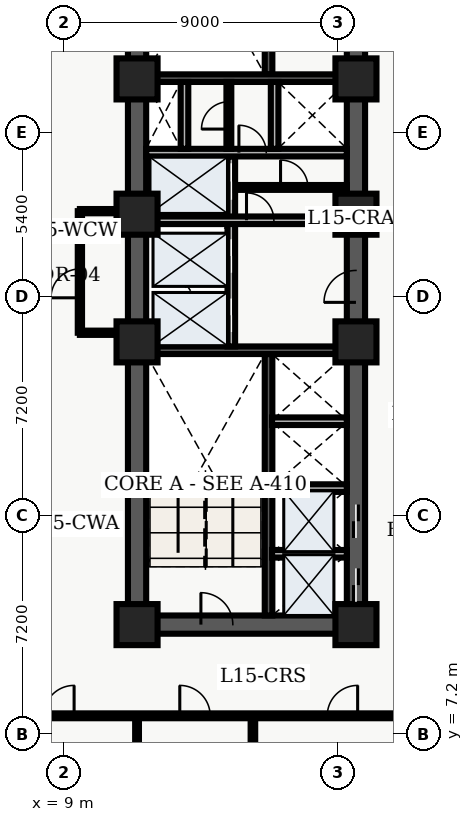
"""IFC4 building model, lengths in metres.
Left out: names, types, materials, properties, quantities, classifications, styles, units other than length and angle.
Written with IfcOpenShell. Run it as: python <this file> out.ifc"""

import sys

from ifc_helpers import new_model, entity, si_unit, converted_unit, direction, frame, origin_with_axes, origin_2d_with_axis, place, context, subcontext, project, spatial, polyline, rectangle, outline, extrude, element, fill, save


model = new_model("IFC4")
c1 = context("Model", 3, precision=1e-05, world=origin_with_axes(), true_north=direction((0.0, 1.0)))
c2 = subcontext(c1, "Body", "Model", "MODEL_VIEW")
j1 = project(units=[si_unit("LENGTHUNIT", "METRE"), converted_unit("PLANEANGLEUNIT", "DEGREE", entity("IfcPlaneAngleMeasure", 0.017), si_unit("PLANEANGLEUNIT", "RADIAN"), dimensions=[0, 0, 0, 0, 0, 0, 0])], contexts=[c1])
p1 = place(None, origin_with_axes())
s1 = spatial("IfcSite", under=j1, at=p1, CompositionType="ELEMENT")
p2 = place(p1, origin_with_axes())
s2 = spatial("IfcBuilding", under=s1, at=p2, CompositionType="ELEMENT")
p3 = place(p2, frame((0.0, 0.0, 63.9), z_axis=(0.0, 0.0, 1.0), x_axis=(1.0, 0.0, 0.0)))
s3 = spatial("IfcBuildingStorey", under=s2, at=p3, CompositionType="ELEMENT", Elevation=63.9)
p4 = place(p3, frame((11.4, 10.8, 0.0), z_axis=(0.0, 0.0, 1.0), x_axis=(0.0, 1.0, 0.0)))
e1 = element("IfcWall", 1, at=p4, inside=s3, PredefinedType="SHEAR", context=c2, shape_type="SweptSolid", body=[
    extrude(outline(polyline([(0.0, -0.3), (27.0, -0.3), (27.0, 0.3), (0.0, 0.3), (0.0, -0.3)])), origin_with_axes(), (0.0, 0.0, 1.0), 3.66),
])
p5 = place(p3, frame((11.4, 10.8, 0.0), z_axis=(0.0, 0.0, 1.0), x_axis=(1.0, 0.0, 0.0)))
e2 = element("IfcWall", 2, at=p5, inside=s3, PredefinedType="SHEAR", context=c2, shape_type="SweptSolid", body=[
    extrude(outline(polyline([(0.0, -0.3), (7.2, -0.3), (7.2, 0.3), (0.0, 0.3), (0.0, -0.3)])), origin_with_axes(), (0.0, 0.0, 1.0), 3.66),
])
p6 = place(p5, frame((2.625, 0.0, 0.0), z_axis=(0.0, 0.0, 1.0), x_axis=(1.0, 0.0, 0.0)))
e3 = element("IfcOpeningElement", 3, at=p6, cuts=e2, PredefinedType="OPENING", context=c2, shape_type="SweptSolid", body=[
    extrude(rectangle(XDim=1.05, YDim=0.62, at=origin_2d_with_axis()), origin_with_axes(), (0.0, 0.0, 1.0), 2.15),
])
p7 = place(p3, frame((18.6, 10.8, 0.0), z_axis=(0.0, 0.0, 1.0), x_axis=(0.0, 1.0, 0.0)))
e4 = element("IfcWall", 4, at=p7, inside=s3, PredefinedType="SHEAR", context=c2, shape_type="SweptSolid", body=[
    extrude(outline(polyline([(0.0, -0.3), (13.5, -0.3), (13.5, 0.3), (0.0, 0.3), (0.0, -0.3)])), origin_with_axes(), (0.0, 0.0, 1.0), 3.66),
])
p8 = place(p7, frame((1.3, 0.0, 0.0), z_axis=(0.0, 0.0, 1.0), x_axis=(1.0, 0.0, 0.0)))
e5 = element("IfcOpeningElement", 5, at=p8, cuts=e4, PredefinedType="OPENING", context=c2, shape_type="SweptSolid", body=[
    extrude(rectangle(XDim=1.1, YDim=0.62, at=origin_2d_with_axis()), origin_with_axes(), (0.0, 0.0, 1.0), 2.15),
])
p9 = place(p7, frame((3.4, 0.0, 0.0), z_axis=(0.0, 0.0, 1.0), x_axis=(1.0, 0.0, 0.0)))
e6 = element("IfcOpeningElement", 6, at=p9, cuts=e4, PredefinedType="OPENING", context=c2, shape_type="SweptSolid", body=[
    extrude(rectangle(XDim=1.1, YDim=0.62, at=origin_2d_with_axis()), origin_with_axes(), (0.0, 0.0, 1.0), 2.15),
])
p10 = place(p7, frame((11.125, 0.0, 0.0), z_axis=(0.0, 0.0, 1.0), x_axis=(1.0, 0.0, 0.0)))
e7 = element("IfcOpeningElement", 7, at=p10, cuts=e4, PredefinedType="OPENING", context=c2, shape_type="SweptSolid", body=[
    extrude(rectangle(XDim=1.05, YDim=0.62, at=origin_2d_with_axis()), origin_with_axes(), (0.0, 0.0, 1.0), 2.15),
])
p11 = place(p3, frame((18.6, 24.3, 0.0), z_axis=(0.0, 0.0, 1.0), x_axis=(0.0, 1.0, 0.0)))
e8 = element("IfcWall", 8, at=p11, inside=s3, PredefinedType="SHEAR", context=c2, shape_type="SweptSolid", body=[
    extrude(outline(polyline([(0.0, -0.3), (13.5, -0.3), (13.5, 0.3), (0.0, 0.3), (0.0, -0.3)])), origin_with_axes(), (0.0, 0.0, 1.0), 3.66),
])
p12 = place(p11, frame((6.025, 0.0, 0.0), z_axis=(0.0, 0.0, 1.0), x_axis=(1.0, 0.0, 0.0)))
e9 = element("IfcOpeningElement", 9, at=p12, cuts=e8, PredefinedType="OPENING", context=c2, shape_type="SweptSolid", body=[
    extrude(rectangle(XDim=0.95, YDim=0.62, at=origin_2d_with_axis()), origin_with_axes(), (0.0, 0.0, 1.0), 2.15),
])
p13 = place(p11, frame((7.825, 0.0, 0.0), z_axis=(0.0, 0.0, 1.0), x_axis=(1.0, 0.0, 0.0)))
e10 = element("IfcOpeningElement", 10, at=p13, cuts=e8, PredefinedType="OPENING", context=c2, shape_type="SweptSolid", body=[
    extrude(rectangle(XDim=0.95, YDim=0.62, at=origin_2d_with_axis()), origin_with_axes(), (0.0, 0.0, 1.0), 2.15),
])
p14 = place(p3, frame((15.725, 11.1, 0.0), z_axis=(0.0, 0.0, 1.0), x_axis=(0.0, 1.0, 0.0)))
e11 = element("IfcWall", 11, at=p14, inside=s3, PredefinedType="SHEAR", context=c2, shape_type="SweptSolid", body=[
    extrude(outline(polyline([(0.0, -0.125), (8.6, -0.125), (8.6, 0.125), (0.0, 0.125), (0.0, -0.125)])), origin_with_axes(), (0.0, 0.0, 1.0), 3.66),
])
p15 = place(p3, frame((11.7, 19.825, 0.0), z_axis=(0.0, 0.0, 1.0), x_axis=(1.0, 0.0, 0.0)))
e12 = element("IfcWall", 12, at=p15, inside=s3, PredefinedType="SHEAR", context=c2, shape_type="SweptSolid", body=[
    extrude(outline(polyline([(0.0, -0.125), (6.6, -0.125), (6.6, 0.125), (0.0, 0.125), (0.0, -0.125)])), origin_with_axes(), (0.0, 0.0, 1.0), 3.66),
])
p16 = place(p3, frame((15.725, 28.9, 0.0), z_axis=(0.0, 0.0, 1.0), x_axis=(0.0, 1.0, 0.0)))
e13 = element("IfcWall", 13, at=p16, inside=s3, PredefinedType="SHEAR", context=c2, shape_type="SweptSolid", body=[
    extrude(outline(polyline([(0.0, -0.125), (8.6, -0.125), (8.6, 0.125), (0.0, 0.125), (0.0, -0.125)])), origin_with_axes(), (0.0, 0.0, 1.0), 3.66),
])
p17 = place(p3, frame((11.7, 28.775, 0.0), z_axis=(0.0, 0.0, 1.0), x_axis=(1.0, 0.0, 0.0)))
e14 = element("IfcWall", 14, at=p17, inside=s3, PredefinedType="SHEAR", context=c2, shape_type="SweptSolid", body=[
    extrude(outline(polyline([(0.0, -0.125), (6.6, -0.125), (6.6, 0.125), (0.0, 0.125), (0.0, -0.125)])), origin_with_axes(), (0.0, 0.0, 1.0), 3.66),
])
p18 = place(p3, frame((14.5, 19.95, 0.0), z_axis=(0.0, 0.0, 1.0), x_axis=(0.0, 1.0, 0.0)))
e15 = element("IfcWall", 15, at=p18, inside=s3, PredefinedType="SOLIDWALL", context=c2, shape_type="SweptSolid", body=[
    extrude(outline(polyline([(0.0, -0.125), (6.25, -0.125), (6.25, 0.125), (0.0, 0.125), (0.0, -0.125)])), origin_with_axes(), (0.0, 0.0, 1.0), 2.7),
])
p19 = place(p18, frame((1.025, 0.0, 0.0), z_axis=(0.0, 0.0, 1.0), x_axis=(1.0, 0.0, 0.0)))
e16 = element("IfcOpeningElement", 16, at=p19, cuts=e15, PredefinedType="OPENING", context=c2, shape_type="SweptSolid", body=[
    extrude(rectangle(XDim=1.1, YDim=0.27, at=origin_2d_with_axis()), origin_with_axes(), (0.0, 0.0, 1.0), 2.15),
])
p20 = place(p18, frame((2.975, 0.0, 0.0), z_axis=(0.0, 0.0, 1.0), x_axis=(1.0, 0.0, 0.0)))
e17 = element("IfcOpeningElement", 17, at=p20, cuts=e15, PredefinedType="OPENING", context=c2, shape_type="SweptSolid", body=[
    extrude(rectangle(XDim=1.1, YDim=0.27, at=origin_2d_with_axis()), origin_with_axes(), (0.0, 0.0, 1.0), 2.15),
])
p21 = place(p18, frame((5.425, 0.0, 0.0), z_axis=(0.0, 0.0, 1.0), x_axis=(1.0, 0.0, 0.0)))
e18 = element("IfcOpeningElement", 18, at=p21, cuts=e15, PredefinedType="OPENING", context=c2, shape_type="SweptSolid", body=[
    extrude(rectangle(XDim=1.2, YDim=0.27, at=origin_2d_with_axis()), origin_with_axes(), (0.0, 0.0, 1.0), 2.15),
])
p22 = place(p3, frame((11.7, 24.1, 0.0), z_axis=(0.0, 0.0, 1.0), x_axis=(1.0, 0.0, 0.0)))
e19 = element("IfcWall", 19, at=p22, inside=s3, PredefinedType="SOLIDWALL", context=c2, shape_type="SweptSolid", body=[
    extrude(outline(polyline([(0.0, -0.125), (6.6, -0.125), (6.6, 0.125), (0.0, 0.125), (0.0, -0.125)])), origin_with_axes(), (0.0, 0.0, 1.0), 2.7),
])
p23 = place(p22, frame((3.75, 0.0, 0.0), z_axis=(0.0, 0.0, 1.0), x_axis=(1.0, 0.0, 0.0)))
e20 = element("IfcOpeningElement", 20, at=p23, cuts=e19, PredefinedType="OPENING", context=c2, shape_type="SweptSolid", body=[
    extrude(rectangle(XDim=0.9, YDim=0.27, at=origin_2d_with_axis()), origin_with_axes(), (0.0, 0.0, 1.0), 2.15),
])
p24 = place(p3, frame((11.7, 26.325, 0.0), z_axis=(0.0, 0.0, 1.0), x_axis=(1.0, 0.0, 0.0)))
e21 = element("IfcWall", 21, at=p24, inside=s3, PredefinedType="SOLIDWALL", context=c2, shape_type="SweptSolid", body=[
    extrude(outline(polyline([(0.0, -0.125), (6.6, -0.125), (6.6, 0.125), (0.0, 0.125), (0.0, -0.125)])), origin_with_axes(), (0.0, 0.0, 1.0), 2.7),
])
p25 = place(p24, frame((3.5, 0.0, 0.0), z_axis=(0.0, 0.0, 1.0), x_axis=(1.0, 0.0, 0.0)))
e22 = element("IfcOpeningElement", 22, at=p25, cuts=e21, PredefinedType="OPENING", context=c2, shape_type="SweptSolid", body=[
    extrude(rectangle(XDim=0.9, YDim=0.27, at=origin_2d_with_axis()), origin_with_axes(), (0.0, 0.0, 1.0), 2.15),
])
for number, where, z_axis, x_axis in (
    (23, (12.96, 26.45, 0.0), (0.0, 0.0, 1.0), (0.0, 1.0, 0.0)),
    (24, (15.925, 26.45, 0.0), (0.0, 0.0, 1.0), (0.0, 1.0, 0.0)),
):
    element("IfcWall", number, at=place(p3, frame(where, z_axis=z_axis, x_axis=x_axis)), inside=s3, PredefinedType="SOLIDWALL", context=c2, shape_type="SweptSolid", body=[
        extrude(outline(polyline([(0.0, -0.125), (2.2, -0.125), (2.2, 0.125), (0.0, 0.125), (0.0, -0.125)])), origin_with_axes(), (0.0, 0.0, 1.0), 2.7),
    ])
for number, where, z_axis, x_axis in (
    (25, (11.4, 10.8, 0.0), (0.0, 0.0, 1.0), (1.0, 0.0, 0.0)),
    (26, (11.4, 20.1, 0.0), (0.0, 0.0, 1.0), (1.0, 0.0, 0.0)),
    (27, (11.4, 24.3, 0.0), (0.0, 0.0, 1.0), (1.0, 0.0, 0.0)),
    (28, (11.4, 28.75, 0.0), (0.0, 0.0, 1.0), (1.0, 0.0, 0.0)),
    (29, (18.6, 10.8, 0.0), (0.0, 0.0, 1.0), (1.0, 0.0, 0.0)),
    (30, (18.6, 20.1, 0.0), (0.0, 0.0, 1.0), (1.0, 0.0, 0.0)),
    (31, (18.6, 24.3, 0.0), (0.0, 0.0, 1.0), (1.0, 0.0, 0.0)),
    (32, (18.6, 28.75, 0.0), (0.0, 0.0, 1.0), (1.0, 0.0, 0.0)),
):
    element("IfcColumn", number, at=place(p3, frame(where, z_axis=z_axis, x_axis=x_axis)), inside=s3, PredefinedType="COLUMN", context=c2, shape_type="SweptSolid", body=[
        extrude(rectangle(XDim=1.35, YDim=1.35, at=origin_2d_with_axis()), origin_with_axes(), (0.0, 0.0, 1.0), 3.9),
    ])
p26 = place(p3, frame((14.62, 25.18, 0.0), z_axis=(0.0, 0.0, 1.0), x_axis=(1.0, 0.0, 0.0)))
e33 = element("IfcWall", 33, at=p26, inside=s3, PredefinedType="PARTITIONING", context=c2, shape_type="SweptSolid", body=[
    extrude(outline(polyline([(0.0, -0.08), (3.68, -0.08), (3.68, 0.08), (0.0, 0.08), (0.0, -0.08)])), origin_with_axes(), (0.0, 0.0, 1.0), 2.7),
])
p27 = place(p26, frame((1.95, 0.0, 0.0), z_axis=(0.0, 0.0, 1.0), x_axis=(1.0, 0.0, 0.0)))
e34 = element("IfcOpeningElement", 34, at=p27, cuts=e33, PredefinedType="OPENING", context=c2, shape_type="SweptSolid", body=[
    extrude(rectangle(XDim=0.9, YDim=0.18, at=origin_2d_with_axis()), origin_with_axes(), (0.0, 0.0, 1.0), 2.15),
])
p28 = place(p3, frame((14.42, 26.45, 0.0), z_axis=(0.0, 0.0, 1.0), x_axis=(0.0, 1.0, 0.0)))
e35 = element("IfcWall", 35, at=p28, inside=s3, PredefinedType="PARTITIONING", context=c2, shape_type="SweptSolid", body=[
    extrude(outline(polyline([(0.0, -0.08), (2.2, -0.08), (2.2, 0.08), (0.0, 0.08), (0.0, -0.08)])), origin_with_axes(), (0.0, 0.0, 1.0), 2.7),
])
p29 = place(p28, frame((1.1, 0.0, 0.0), z_axis=(0.0, 0.0, 1.0), x_axis=(1.0, 0.0, 0.0)))
e36 = element("IfcOpeningElement", 36, at=p29, cuts=e35, PredefinedType="OPENING", context=c2, shape_type="SweptSolid", body=[
    extrude(rectangle(XDim=0.9, YDim=0.18, at=origin_2d_with_axis()), origin_with_axes(), (0.0, 0.0, 1.0), 2.15),
])
for number, where, z_axis, x_axis in (
    (37, (15.84, 13.13, 0.0), (0.0, 0.0, 1.0), (1.0, 0.0, 0.0)),
    (38, (15.84, 15.29, 0.0), (0.0, 0.0, 1.0), (1.0, 0.0, 0.0)),
    (39, (15.84, 17.49, 0.0), (0.0, 0.0, 1.0), (1.0, 0.0, 0.0)),
):
    element("IfcWall", number, at=place(p3, frame(where, z_axis=z_axis, x_axis=x_axis)), inside=s3, PredefinedType="SOLIDWALL", context=c2, shape_type="SweptSolid", body=[
        extrude(outline(polyline([(0.0, -0.125), (2.46, -0.125), (2.46, 0.125), (0.0, 0.125), (0.0, -0.125)])), origin_with_axes(), (0.0, 0.0, 1.0), 2.7),
    ])
p30 = place(p3, frame((9.52, 20.4, 0.0), z_axis=(0.0, 0.0, 1.0), x_axis=(0.0, 1.0, 0.0)))
e40 = element("IfcWall", 40, at=p30, inside=s3, PredefinedType="PARTITIONING", context=c2, shape_type="SweptSolid", body=[
    extrude(outline(polyline([(0.0, -0.07), (4.0, -0.07), (4.0, 0.07), (0.0, 0.07), (0.0, -0.07)])), origin_with_axes(), (0.0, 0.0, 1.0), 2.7),
])
p31 = place(p30, frame((1.625, 0.0, 0.0), z_axis=(0.0, 0.0, 1.0), x_axis=(1.0, 0.0, 0.0)))
e41 = element("IfcOpeningElement", 41, at=p31, cuts=e40, PredefinedType="OPENING", context=c2, shape_type="SweptSolid", body=[
    extrude(rectangle(XDim=0.95, YDim=0.16, at=origin_2d_with_axis()), origin_with_axes(), (0.0, 0.0, 1.0), 2.15),
])
for number, where, z_axis, x_axis in (
    (42, (9.52, 20.4, 0.0), (0.0, 0.0, 1.0), (1.0, 0.0, 0.0)),
    (43, (9.52, 24.4, 0.0), (0.0, 0.0, 1.0), (1.0, 0.0, 0.0)),
):
    element("IfcWall", number, at=place(p3, frame(where, z_axis=z_axis, x_axis=x_axis)), inside=s3, PredefinedType="PARTITIONING", context=c2, shape_type="SweptSolid", body=[
        extrude(outline(polyline([(0.0, -0.07), (1.58, -0.07), (1.58, 0.07), (0.0, 0.07), (0.0, -0.07)])), origin_with_axes(), (0.0, 0.0, 1.0), 2.7),
    ])
p32 = place(p3, frame((2.6, 7.8, 0.0), z_axis=(0.0, 0.0, 1.0), x_axis=(1.0, 0.0, 0.0)))
e44 = element("IfcWall", 44, at=p32, inside=s3, PredefinedType="PARTITIONING", context=c2, shape_type="SweptSolid", body=[
    extrude(outline(polyline([(0.0, -0.08), (18.55, -0.08), (18.55, 0.08), (0.0, 0.08), (0.0, -0.08)])), origin_with_axes(), (0.0, 0.0, 1.0), 2.7),
])
p33 = place(p32, frame((1.825, 0.0, 0.0), z_axis=(0.0, 0.0, 1.0), x_axis=(1.0, 0.0, 0.0)))
e45 = element("IfcOpeningElement", 45, at=p33, cuts=e44, PredefinedType="OPENING", context=c2, shape_type="SweptSolid", body=[
    extrude(rectangle(XDim=1.0, YDim=0.18, at=origin_2d_with_axis()), origin_with_axes(), (0.0, 0.0, 1.0), 2.15),
])
p34 = place(p32, frame((6.229, 0.0, 0.0), z_axis=(0.0, 0.0, 1.0), x_axis=(1.0, 0.0, 0.0)))
e46 = element("IfcOpeningElement", 46, at=p34, cuts=e44, PredefinedType="OPENING", context=c2, shape_type="SweptSolid", body=[
    extrude(rectangle(XDim=1.0, YDim=0.18, at=origin_2d_with_axis()), origin_with_axes(), (0.0, 0.0, 1.0), 2.15),
])
p35 = place(p32, frame((10.706, 0.0, 0.0), z_axis=(0.0, 0.0, 1.0), x_axis=(1.0, 0.0, 0.0)))
e47 = element("IfcOpeningElement", 47, at=p35, cuts=e44, PredefinedType="OPENING", context=c2, shape_type="SweptSolid", body=[
    extrude(rectangle(XDim=1.0, YDim=0.18, at=origin_2d_with_axis()), origin_with_axes(), (0.0, 0.0, 1.0), 2.15),
])
p36 = place(p32, frame((15.556, 0.0, 0.0), z_axis=(0.0, 0.0, 1.0), x_axis=(1.0, 0.0, 0.0)))
e48 = element("IfcOpeningElement", 48, at=p36, cuts=e44, PredefinedType="OPENING", context=c2, shape_type="SweptSolid", body=[
    extrude(rectangle(XDim=1.0, YDim=0.18, at=origin_2d_with_axis()), origin_with_axes(), (0.0, 0.0, 1.0), 2.15),
])
p37 = place(p3, frame((11.4, 0.36, 0.0), z_axis=(0.0, 0.0, 1.0), x_axis=(0.0, 1.0, 0.0)))
e49 = element("IfcWall", 49, at=p37, inside=s3, PredefinedType="PARTITIONING", context=c2, shape_type="SweptSolid", body=[
    extrude(outline(polyline([(0.0, -0.062), (7.34, -0.062), (7.34, 0.062), (0.0, 0.062), (0.0, -0.062)])), origin_with_axes(), (0.0, 0.0, 1.0), 2.7),
])
p38 = place(p3, frame((15.211, 0.36, 0.0), z_axis=(0.0, 0.0, 1.0), x_axis=(0.0, 1.0, 0.0)))
e50 = element("IfcWall", 50, at=p38, inside=s3, PredefinedType="PARTITIONING", context=c2, shape_type="SweptSolid", body=[
    extrude(outline(polyline([(0.0, -0.075), (7.34, -0.075), (7.34, 0.075), (0.0, 0.075), (0.0, -0.075)])), origin_with_axes(), (0.0, 0.0, 1.0), 2.7),
])
p39 = place(p7, frame((1.3, 0.0, 0.0), z_axis=(0.0, 0.0, 1.0), x_axis=(1.0, 0.0, 0.0)))
e51 = element("IfcDoor", 51, at=p39, inside=s3, OperationType="SLIDING_TO_LEFT", PredefinedType="DOOR", context=c2, shape_type="SweptSolid", body=[
    extrude(rectangle(XDim=1.1, YDim=0.09, at=origin_2d_with_axis()), origin_with_axes(), (0.0, 0.0, 1.0), 2.15),
])
fill(e5, e51)
p40 = place(p7, frame((3.4, 0.0, 0.0), z_axis=(0.0, 0.0, 1.0), x_axis=(1.0, 0.0, 0.0)))
e52 = element("IfcDoor", 52, at=p40, inside=s3, OperationType="SLIDING_TO_RIGHT", PredefinedType="DOOR", context=c2, shape_type="SweptSolid", body=[
    extrude(rectangle(XDim=1.1, YDim=0.09, at=origin_2d_with_axis()), origin_with_axes(), (0.0, 0.0, 1.0), 2.15),
])
fill(e6, e52)
p41 = place(p18, frame((1.025, 0.0, 0.0), z_axis=(0.0, 0.0, 1.0), x_axis=(1.0, 0.0, 0.0)))
e53 = element("IfcDoor", 53, at=p41, inside=s3, OperationType="SLIDING_TO_LEFT", PredefinedType="DOOR", context=c2, shape_type="SweptSolid", body=[
    extrude(rectangle(XDim=1.1, YDim=0.09, at=origin_2d_with_axis()), origin_with_axes(), (0.0, 0.0, 1.0), 2.15),
])
fill(e16, e53)
p42 = place(p18, frame((2.975, 0.0, 0.0), z_axis=(0.0, 0.0, 1.0), x_axis=(1.0, 0.0, 0.0)))
e54 = element("IfcDoor", 54, at=p42, inside=s3, OperationType="SLIDING_TO_RIGHT", PredefinedType="DOOR", context=c2, shape_type="SweptSolid", body=[
    extrude(rectangle(XDim=1.1, YDim=0.09, at=origin_2d_with_axis()), origin_with_axes(), (0.0, 0.0, 1.0), 2.15),
])
fill(e17, e54)
p43 = place(p18, frame((5.425, 0.0, 0.0), z_axis=(0.0, 0.0, 1.0), x_axis=(1.0, 0.0, 0.0)))
e55 = element("IfcDoor", 55, at=p43, inside=s3, OperationType="DOUBLE_DOOR_SLIDING", PredefinedType="DOOR", context=c2, shape_type="SweptSolid", body=[
    extrude(rectangle(XDim=1.2, YDim=0.09, at=origin_2d_with_axis()), origin_with_axes(), (0.0, 0.0, 1.0), 2.15),
])
fill(e18, e55)
p44 = place(p5, frame((2.625, 0.0, 0.0), z_axis=(0.0, 0.0, 1.0), x_axis=(1.0, 0.0, 0.0)))
e56 = element("IfcDoor", 56, at=p44, inside=s3, OperationType="SINGLE_SWING_LEFT", PredefinedType="DOOR", context=c2, shape_type="SweptSolid", body=[
    extrude(rectangle(XDim=1.05, YDim=0.09, at=origin_2d_with_axis()), origin_with_axes(), (0.0, 0.0, 1.0), 2.15),
])
fill(e3, e56)
p45 = place(p7, frame((11.125, 0.0, 0.0), z_axis=(0.0, 0.0, 1.0), x_axis=(1.0, 0.0, 0.0)))
e57 = element("IfcDoor", 57, at=p45, inside=s3, OperationType="SINGLE_SWING_LEFT", PredefinedType="DOOR", context=c2, shape_type="SweptSolid", body=[
    extrude(rectangle(XDim=1.05, YDim=0.09, at=origin_2d_with_axis()), origin_with_axes(), (0.0, 0.0, 1.0), 2.15),
])
fill(e7, e57)
p46 = place(p24, frame((3.5, 0.0, 0.0), z_axis=(0.0, 0.0, 1.0), x_axis=(1.0, 0.0, 0.0)))
e58 = element("IfcDoor", 58, at=p46, inside=s3, OperationType="SINGLE_SWING_LEFT", PredefinedType="DOOR", context=c2, shape_type="SweptSolid", body=[
    extrude(rectangle(XDim=0.9, YDim=0.09, at=origin_2d_with_axis()), origin_with_axes(), (0.0, 0.0, 1.0), 2.15),
])
fill(e22, e58)
p47 = place(p28, frame((1.1, 0.0, 0.0), z_axis=(0.0, 0.0, 1.0), x_axis=(1.0, 0.0, 0.0)))
e59 = element("IfcDoor", 59, at=p47, inside=s3, OperationType="SINGLE_SWING_LEFT", PredefinedType="DOOR", context=c2, shape_type="SweptSolid", body=[
    extrude(rectangle(XDim=0.9, YDim=0.09, at=origin_2d_with_axis()), origin_with_axes(), (0.0, 0.0, 1.0), 2.15),
])
fill(e36, e59)
p48 = place(p22, frame((3.75, 0.0, 0.0), z_axis=(0.0, 0.0, 1.0), x_axis=(1.0, 0.0, 0.0)))
e60 = element("IfcDoor", 60, at=p48, inside=s3, OperationType="SINGLE_SWING_LEFT", PredefinedType="DOOR", context=c2, shape_type="SweptSolid", body=[
    extrude(rectangle(XDim=0.9, YDim=0.09, at=origin_2d_with_axis()), origin_with_axes(), (0.0, 0.0, 1.0), 2.15),
])
fill(e20, e60)
p49 = place(p26, frame((1.95, 0.0, 0.0), z_axis=(0.0, 0.0, 1.0), x_axis=(1.0, 0.0, 0.0)))
e61 = element("IfcDoor", 61, at=p49, inside=s3, OperationType="SINGLE_SWING_LEFT", PredefinedType="DOOR", context=c2, shape_type="SweptSolid", body=[
    extrude(rectangle(XDim=0.9, YDim=0.09, at=origin_2d_with_axis()), origin_with_axes(), (0.0, 0.0, 1.0), 2.15),
])
fill(e34, e61)
p50 = place(p30, frame((1.625, 0.0, 0.0), z_axis=(0.0, 0.0, 1.0), x_axis=(1.0, 0.0, 0.0)))
e62 = element("IfcDoor", 62, at=p50, inside=s3, OperationType="SINGLE_SWING_LEFT", PredefinedType="DOOR", context=c2, shape_type="SweptSolid", body=[
    extrude(rectangle(XDim=0.95, YDim=0.084, at=origin_2d_with_axis()), origin_with_axes(), (0.0, 0.0, 1.0), 2.15),
])
fill(e41, e62)
p51 = place(p32, frame((6.229, 0.0, 0.0), z_axis=(0.0, 0.0, 1.0), x_axis=(1.0, 0.0, 0.0)))
e63 = element("IfcDoor", 63, at=p51, inside=s3, OperationType="SINGLE_SWING_RIGHT", PredefinedType="DOOR", context=c2, shape_type="SweptSolid", body=[
    extrude(rectangle(XDim=1.0, YDim=0.09, at=origin_2d_with_axis()), origin_with_axes(), (0.0, 0.0, 1.0), 2.15),
])
fill(e46, e63)
p52 = place(p32, frame((10.706, 0.0, 0.0), z_axis=(0.0, 0.0, 1.0), x_axis=(1.0, 0.0, 0.0)))
e64 = element("IfcDoor", 64, at=p52, inside=s3, OperationType="SINGLE_SWING_LEFT", PredefinedType="DOOR", context=c2, shape_type="SweptSolid", body=[
    extrude(rectangle(XDim=1.0, YDim=0.09, at=origin_2d_with_axis()), origin_with_axes(), (0.0, 0.0, 1.0), 2.15),
])
fill(e47, e64)
p53 = place(p32, frame((15.556, 0.0, 0.0), z_axis=(0.0, 0.0, 1.0), x_axis=(1.0, 0.0, 0.0)))
e65 = element("IfcDoor", 65, at=p53, inside=s3, OperationType="SINGLE_SWING_RIGHT", PredefinedType="DOOR", context=c2, shape_type="SweptSolid", body=[
    extrude(rectangle(XDim=1.0, YDim=0.09, at=origin_2d_with_axis()), origin_with_axes(), (0.0, 0.0, 1.0), 2.15),
])
fill(e48, e65)
save(model, sys.argv[1])
